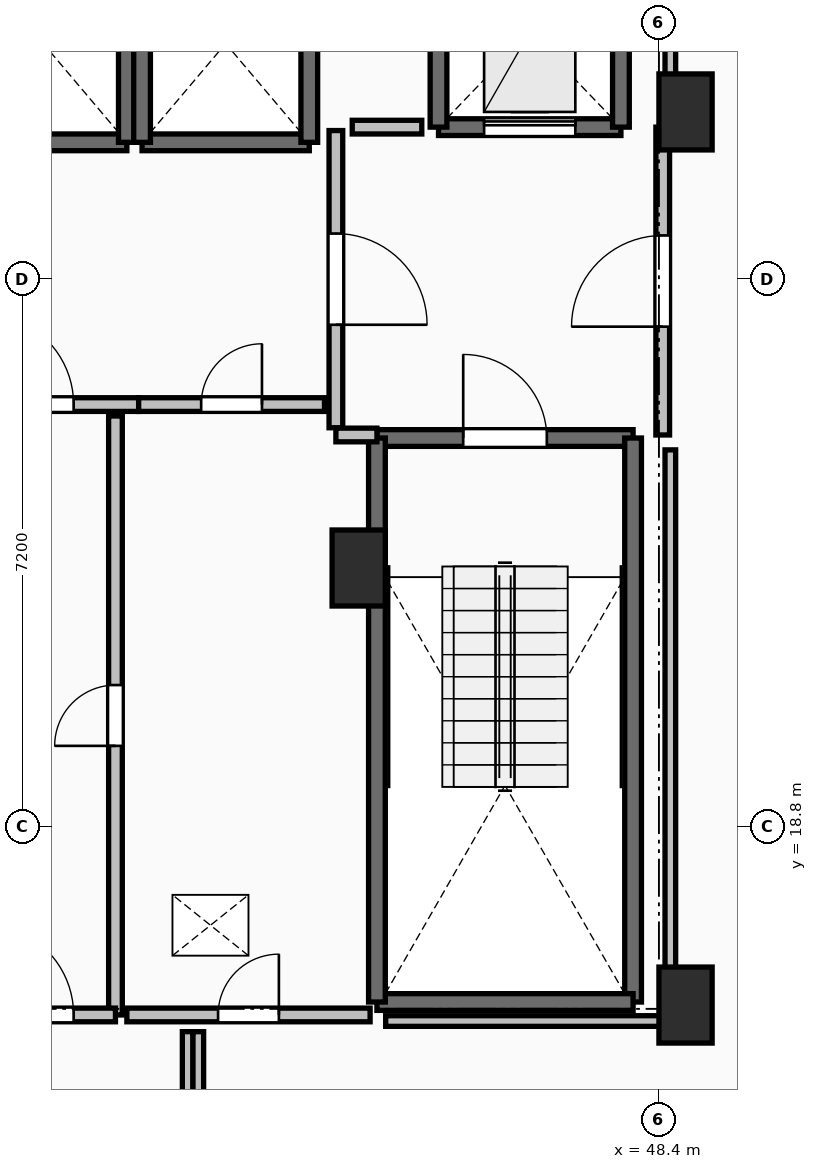
"""IFC4 building model, lengths in metres.
Left out: names, types, materials, properties, quantities, classifications, styles, units other than length and angle.
Written with IfcOpenShell. Run it as: python <this file> out.ifc"""

import sys

from ifc_helpers import new_model, si_unit, direction, frame, frame_2d, origin, origin_2d, place, context, subcontext, project, spatial, rectangle, extrude, element, fill, save


model = new_model("IFC4")
c1 = context("Model", 3, precision=1e-05, world=origin(), true_north=direction((0.0, 1.0)))
c2 = subcontext(c1, "Body", "Model", "MODEL_VIEW")
j1 = project(units=[si_unit("LENGTHUNIT", "METRE"), si_unit("PLANEANGLEUNIT", "RADIAN")], contexts=[c1])
p1 = place(None, origin())
s1 = spatial("IfcSite", under=j1, at=p1, CompositionType="ELEMENT")
p2 = place(p1, origin())
s2 = spatial("IfcBuilding", under=s1, at=p2, CompositionType="ELEMENT")
p3 = place(p2, frame((0.0, 0.0, 200.1)))
s3 = spatial("IfcBuildingStorey", under=s2, at=p3, CompositionType="ELEMENT", Elevation=200.1)
for number, where, z_axis, x_axis in (
    (1, (48.75, 28.2, 0.0), (0.0, 0.0, 1.0), (1.0, 0.0, 0.0)),
    (2, (48.75, 16.45, 0.0), (0.0, 0.0, 1.0), (1.0, 0.0, 0.0)),
    (3, (44.45, 22.2, 0.0), (0.0, 0.0, 1.0), (1.0, 0.0, 0.0)),
):
    element("IfcColumn", number, at=place(p3, frame(where, z_axis=z_axis, x_axis=x_axis)), inside=s3, PredefinedType="PILASTER", context=c2, shape_type="SweptSolid", body=[
        extrude(rectangle(XDim=0.7, YDim=1.0, at=origin_2d()), origin(), (0.0, 0.0, 1.0), 3.55),
    ])
p4 = place(p3, frame((44.69, 23.91, 0.0), z_axis=(0.0, 0.0, 1.0), x_axis=(1.0, 0.0, 0.0)))
e4 = element("IfcWall", 4, at=p4, inside=s3, PredefinedType="SOLIDWALL", context=c2, shape_type="SweptSolid", body=[
    extrude(rectangle(XDim=3.37, YDim=0.22, at=frame_2d((1.685, 0.0))), origin(), (0.0, 0.0, 1.0), 3.29),
])
p5 = place(p4, frame((1.135, 0.0, 0.0)))
e5 = element("IfcOpeningElement", 5, at=p5, cuts=e4, PredefinedType="OPENING", context=c2, shape_type="SweptSolid", body=[
    extrude(rectangle(XDim=1.1, YDim=2.15, at=frame_2d((0.55, 1.075))), frame((0.0, 0.125, 0.0), z_axis=(0.0, -1.0, 0.0), x_axis=(1.0, 0.0, 0.0)), (0.0, 0.0, 1.0), 0.25),
])
p6 = place(p3, frame((48.06, 23.91, 0.0), z_axis=(0.0, 0.0, 1.0), x_axis=(0.0, -1.0, 0.0)))
e6 = element("IfcWall", 6, at=p6, inside=s3, PredefinedType="SOLIDWALL", context=c2, shape_type="SweptSolid", body=[
    extrude(rectangle(XDim=7.42, YDim=0.22, at=frame_2d((3.71, 0.0))), origin(), (0.0, 0.0, 1.0), 3.29),
])
p7 = place(p3, frame((48.06, 16.49, 0.0), z_axis=(0.0, 0.0, 1.0), x_axis=(-1.0, 0.0, 0.0)))
e7 = element("IfcWall", 7, at=p7, inside=s3, PredefinedType="SOLIDWALL", context=c2, shape_type="SweptSolid", body=[
    extrude(rectangle(XDim=3.37, YDim=0.22, at=frame_2d((1.685, 0.0))), origin(), (0.0, 0.0, 1.0), 3.29),
])
p8 = place(p3, frame((44.69, 16.49, 0.0), z_axis=(0.0, 0.0, 1.0), x_axis=(0.0, 1.0, 0.0)))
e8 = element("IfcWall", 8, at=p8, inside=s3, PredefinedType="SOLIDWALL", context=c2, shape_type="SweptSolid", body=[
    extrude(rectangle(XDim=7.42, YDim=0.22, at=frame_2d((3.71, 0.0))), origin(), (0.0, 0.0, 1.0), 3.29),
])
p9 = place(p3, frame((39.2, 27.8, 0.0), z_axis=(0.0, 0.0, 1.0), x_axis=(1.0, 0.0, 0.0)))
e9 = element("IfcWall", 9, at=p9, inside=s3, PredefinedType="SOLIDWALL", context=c2, shape_type="SweptSolid", body=[
    extrude(rectangle(XDim=2.2, YDim=0.22, at=frame_2d((1.1, 0.0))), origin(), (0.0, 0.0, 1.0), 3.29),
])
p10 = place(p3, frame((41.4, 27.8, 0.0), z_axis=(0.0, 0.0, 1.0), x_axis=(0.0, 1.0, 0.0)))
e10 = element("IfcWall", 10, at=p10, inside=s3, PredefinedType="SOLIDWALL", context=c2, shape_type="SweptSolid", body=[
    extrude(rectangle(XDim=2.6, YDim=0.22, at=frame_2d((1.3, 0.0))), origin(), (0.0, 0.0, 1.0), 3.29),
])
p11 = place(p3, frame((41.6, 27.8, 0.0), z_axis=(0.0, 0.0, 1.0), x_axis=(1.0, 0.0, 0.0)))
e11 = element("IfcWall", 11, at=p11, inside=s3, PredefinedType="SOLIDWALL", context=c2, shape_type="SweptSolid", body=[
    extrude(rectangle(XDim=2.2, YDim=0.22, at=frame_2d((1.1, 0.0))), origin(), (0.0, 0.0, 1.0), 3.29),
])
for number, where, z_axis, x_axis in (
    (12, (43.8, 27.8, 0.0), (0.0, 0.0, 1.0), (0.0, 1.0, 0.0)),
    (13, (41.6, 30.4, 0.0), (0.0, 0.0, 1.0), (0.0, -1.0, 0.0)),
):
    element("IfcWall", number, at=place(p3, frame(where, z_axis=z_axis, x_axis=x_axis)), inside=s3, PredefinedType="SOLIDWALL", context=c2, shape_type="SweptSolid", body=[
        extrude(rectangle(XDim=2.6, YDim=0.22, at=frame_2d((1.3, 0.0))), origin(), (0.0, 0.0, 1.0), 3.29),
    ])
p12 = place(p3, frame((45.5, 28.0, 0.0), z_axis=(0.0, 0.0, 1.0), x_axis=(1.0, 0.0, 0.0)))
e14 = element("IfcWall", 14, at=p12, inside=s3, PredefinedType="SHEAR", context=c2, shape_type="SweptSolid", body=[
    extrude(rectangle(XDim=2.4, YDim=0.22, at=frame_2d((1.2, 0.0))), origin(), (0.0, 0.0, 1.0), 3.29),
])
p13 = place(p12, frame((0.6, 0.0, 0.0)))
e15 = element("IfcOpeningElement", 15, at=p13, cuts=e14, PredefinedType="OPENING", context=c2, shape_type="SweptSolid", body=[
    extrude(rectangle(XDim=1.2, YDim=2.2, at=frame_2d((0.6, 1.1))), frame((0.0, 0.125, 0.0), z_axis=(0.0, -1.0, 0.0), x_axis=(1.0, 0.0, 0.0)), (0.0, 0.0, 1.0), 0.25),
])
for number, where, z_axis, x_axis in (
    (16, (47.9, 28.0, 0.0), (0.0, 0.0, 1.0), (0.0, 1.0, 0.0)),
    (17, (45.5, 30.5, 0.0), (0.0, 0.0, 1.0), (0.0, -1.0, 0.0)),
):
    element("IfcWall", number, at=place(p3, frame(where, z_axis=z_axis, x_axis=x_axis)), inside=s3, PredefinedType="SHEAR", context=c2, shape_type="SweptSolid", body=[
        extrude(rectangle(XDim=2.5, YDim=0.22, at=frame_2d((1.25, 0.0))), origin(), (0.0, 0.0, 1.0), 3.29),
    ])
p14 = place(p3, frame((44.15, 27.955, 0.0), z_axis=(0.0, 0.0, 1.0), x_axis=(0.0, -1.0, 0.0)))
e18 = element("IfcWall", 18, at=p14, inside=s3, PredefinedType="PARTITIONING", context=c2, shape_type="SweptSolid", body=[
    extrude(rectangle(XDim=3.91, YDim=0.18, at=frame_2d((1.955, 0.0))), origin(), (0.0, 0.0, 1.0), 3.29),
])
p15 = place(p14, frame((1.355, 0.0, 0.0)))
e19 = element("IfcOpeningElement", 19, at=p15, cuts=e18, PredefinedType="OPENING", context=c2, shape_type="SweptSolid", body=[
    extrude(rectangle(XDim=1.2, YDim=2.15, at=frame_2d((0.6, 1.075))), frame((0.0, 0.105, 0.0), z_axis=(0.0, -1.0, 0.0), x_axis=(1.0, 0.0, 0.0)), (0.0, 0.0, 1.0), 0.21),
])
p16 = place(p3, frame((44.15, 23.95, 0.0), z_axis=(0.0, 0.0, 1.0), x_axis=(1.0, 0.0, 0.0)))
e20 = element("IfcWall", 20, at=p16, inside=s3, PredefinedType="PARTITIONING", context=c2, shape_type="SweptSolid", body=[
    extrude(rectangle(XDim=0.54, YDim=0.18, at=frame_2d((0.27, 0.0))), origin(), (0.0, 0.0, 1.0), 3.29),
])
p17 = place(p3, frame((48.45, 23.95, 0.0), z_axis=(0.0, 0.0, 1.0), x_axis=(0.0, 1.0, 0.0)))
e21 = element("IfcWall", 21, at=p17, inside=s3, PredefinedType="PARTITIONING", context=c2, shape_type="SweptSolid", body=[
    extrude(rectangle(XDim=4.05, YDim=0.18, at=frame_2d((2.025, 0.0))), origin(), (0.0, 0.0, 1.0), 3.29),
])
p18 = place(p17, frame((1.425, 0.0, 0.0)))
e22 = element("IfcOpeningElement", 22, at=p18, cuts=e21, PredefinedType="OPENING", context=c2, shape_type="SweptSolid", body=[
    extrude(rectangle(XDim=1.2, YDim=2.15, at=frame_2d((0.6, 1.075))), frame((0.0, 0.105, 0.0), z_axis=(0.0, -1.0, 0.0), x_axis=(1.0, 0.0, 0.0)), (0.0, 0.0, 1.0), 0.21),
])
p19 = place(p3, frame((38.645, 24.35, 0.0), z_axis=(0.0, 0.0, 1.0), x_axis=(1.0, 0.0, 0.0)))
e23 = element("IfcWall", 23, at=p19, inside=s3, PredefinedType="PARTITIONING", context=c2, shape_type="SweptSolid", body=[
    extrude(rectangle(XDim=2.91, YDim=0.18, at=frame_2d((1.455, 0.0))), origin(), (0.0, 0.0, 1.0), 3.29),
])
p20 = place(p19, frame((0.855, 0.0, 0.0)))
e24 = element("IfcOpeningElement", 24, at=p20, cuts=e23, PredefinedType="OPENING", context=c2, shape_type="SweptSolid", body=[
    extrude(rectangle(XDim=1.2, YDim=2.15, at=frame_2d((0.6, 1.075))), frame((0.0, 0.105, 0.0), z_axis=(0.0, -1.0, 0.0), x_axis=(1.0, 0.0, 0.0)), (0.0, 0.0, 1.0), 0.21),
])
p21 = place(p3, frame((41.555, 24.35, 0.0), z_axis=(0.0, 0.0, 1.0), x_axis=(1.0, 0.0, 0.0)))
e25 = element("IfcWall", 25, at=p21, inside=s3, PredefinedType="PARTITIONING", context=c2, shape_type="SweptSolid", body=[
    extrude(rectangle(XDim=2.445, YDim=0.18, at=frame_2d((1.223, 0.0))), origin(), (0.0, 0.0, 1.0), 3.29),
])
p22 = place(p21, frame((0.823, 0.0, 0.0)))
e26 = element("IfcOpeningElement", 26, at=p22, cuts=e25, PredefinedType="OPENING", context=c2, shape_type="SweptSolid", body=[
    extrude(rectangle(XDim=0.8, YDim=2.05, at=frame_2d((0.4, 1.025))), frame((0.0, 0.105, 0.0), z_axis=(0.0, -1.0, 0.0), x_axis=(1.0, 0.0, 0.0)), (0.0, 0.0, 1.0), 0.21),
])
p23 = place(p3, frame((41.25, 16.32, 0.0), z_axis=(0.0, 0.0, 1.0), x_axis=(0.0, 1.0, 0.0)))
e27 = element("IfcWall", 27, at=p23, inside=s3, PredefinedType="PARTITIONING", context=c2, shape_type="SweptSolid", body=[
    extrude(rectangle(XDim=7.88, YDim=0.18, at=frame_2d((3.94, 0.0))), origin(), (0.0, 0.0, 1.0), 3.29),
])
p24 = place(p23, frame((3.54, 0.0, 0.0)))
e28 = element("IfcOpeningElement", 28, at=p24, cuts=e27, PredefinedType="OPENING", context=c2, shape_type="SweptSolid", body=[
    extrude(rectangle(XDim=0.8, YDim=2.05, at=frame_2d((0.4, 1.025))), frame((0.0, 0.105, 0.0), z_axis=(0.0, -1.0, 0.0), x_axis=(1.0, 0.0, 0.0)), (0.0, 0.0, 1.0), 0.21),
])
p25 = place(p3, frame((38.95, 16.32, 0.0), z_axis=(0.0, 0.0, 1.0), x_axis=(1.0, 0.0, 0.0)))
e29 = element("IfcWall", 29, at=p25, inside=s3, PredefinedType="PARTITIONING", context=c2, shape_type="SweptSolid", body=[
    extrude(rectangle(XDim=2.3, YDim=0.18, at=frame_2d((1.15, 0.0))), origin(), (0.0, 0.0, 1.0), 3.29),
])
p26 = place(p25, frame((0.55, 0.0, 0.0)))
e30 = element("IfcOpeningElement", 30, at=p26, cuts=e29, PredefinedType="OPENING", context=c2, shape_type="SweptSolid", body=[
    extrude(rectangle(XDim=1.2, YDim=2.15, at=frame_2d((0.6, 1.075))), frame((0.0, 0.105, 0.0), z_axis=(0.0, -1.0, 0.0), x_axis=(1.0, 0.0, 0.0)), (0.0, 0.0, 1.0), 0.21),
])
p27 = place(p3, frame((41.4, 16.32, 0.0), z_axis=(0.0, 0.0, 1.0), x_axis=(1.0, 0.0, 0.0)))
e31 = element("IfcWall", 31, at=p27, inside=s3, PredefinedType="PARTITIONING", context=c2, shape_type="SweptSolid", body=[
    extrude(rectangle(XDim=3.2, YDim=0.18, at=frame_2d((1.6, 0.0))), origin(), (0.0, 0.0, 1.0), 3.29),
])
p28 = place(p27, frame((1.2, 0.0, 0.0)))
e32 = element("IfcOpeningElement", 32, at=p28, cuts=e31, PredefinedType="OPENING", context=c2, shape_type="SweptSolid", body=[
    extrude(rectangle(XDim=0.8, YDim=2.05, at=frame_2d((0.4, 1.025))), frame((0.0, 0.105, 0.0), z_axis=(0.0, -1.0, 0.0), x_axis=(1.0, 0.0, 0.0)), (0.0, 0.0, 1.0), 0.21),
])
p29 = place(p3, frame((45.28, 28.0, 0.0), z_axis=(0.0, 0.0, 1.0), x_axis=(-1.0, 0.0, 0.0)))
e33 = element("IfcWall", 33, at=p29, inside=s3, PredefinedType="PARTITIONING", context=c2, shape_type="SweptSolid", body=[
    extrude(rectangle(XDim=0.915, YDim=0.18, at=frame_2d((0.458, 0.0))), origin(), (0.0, 0.0, 1.0), 3.29),
])
p30 = place(p3, frame((48.55, 16.24, 0.0), z_axis=(0.0, 0.0, 1.0), x_axis=(0.0, 1.0, 0.0)))
e34 = element("IfcWall", 34, at=p30, inside=s3, PredefinedType="PARTITIONING", context=c2, shape_type="SweptSolid", body=[
    extrude(rectangle(XDim=7.514, YDim=0.14, at=frame_2d((3.757, 0.0))), origin(), (0.0, 0.0, 1.0), 2.482),
])
p31 = place(p3, frame((48.55, 28.196, 0.0), z_axis=(0.0, 0.0, 1.0), x_axis=(0.0, 1.0, 0.0)))
e35 = element("IfcWall", 35, at=p31, inside=s3, PredefinedType="PARTITIONING", context=c2, shape_type="SweptSolid", body=[
    extrude(rectangle(XDim=5.254, YDim=0.14, at=frame_2d((2.627, 0.0))), origin(), (0.0, 0.0, 1.0), 2.482),
])
for number, where, z_axis, x_axis in (
    (36, (42.2, 16.1, 0.0), (0.0, 0.0, 1.0), (0.0, -1.0, 0.0)),
    (37, (42.34, 14.27, 0.0), (0.0, 0.0, 1.0), (0.0, 1.0, 0.0)),
):
    element("IfcWall", number, at=place(p3, frame(where, z_axis=z_axis, x_axis=x_axis)), inside=s3, PredefinedType="PARTITIONING", context=c2, shape_type="SweptSolid", body=[
        extrude(rectangle(XDim=1.83, YDim=0.14, at=frame_2d((0.915, 0.0))), origin(), (0.0, 0.0, 1.0), 3.29),
    ])
p32 = place(p3, frame((44.805, 16.24, 0.0), z_axis=(0.0, 0.0, 1.0), x_axis=(1.0, 0.0, 0.0)))
e38 = element("IfcWall", 38, at=p32, inside=s3, PredefinedType="PARTITIONING", context=c2, shape_type="SweptSolid", body=[
    extrude(rectangle(XDim=3.745, YDim=0.14, at=frame_2d((1.873, 0.0))), origin(), (0.0, 0.0, 1.0), 2.482),
])
p33 = place(p5, origin())
e39 = element("IfcDoor", 39, at=p33, inside=s3, OperationType="SINGLE_SWING_LEFT", PredefinedType="DOOR", context=c2, shape_type="SweptSolid", body=[
    extrude(rectangle(XDim=1.1, YDim=2.15, at=frame_2d((0.55, 1.075))), frame((0.0, 0.025, 0.0), z_axis=(0.0, -1.0, 0.0), x_axis=(1.0, 0.0, 0.0)), (0.0, 0.0, 1.0), 0.05),
])
fill(e5, e39)
p34 = place(p13, origin())
e40 = element("IfcDoor", 40, at=p34, inside=s3, OperationType="SLIDING_TO_LEFT", PredefinedType="DOOR", context=c2, shape_type="SweptSolid", body=[
    extrude(rectangle(XDim=1.2, YDim=2.2, at=frame_2d((0.6, 1.1))), frame((0.0, 0.025, 0.0), z_axis=(0.0, -1.0, 0.0), x_axis=(1.0, 0.0, 0.0)), (0.0, 0.0, 1.0), 0.05),
])
fill(e15, e40)
p35 = place(p15, origin())
e41 = element("IfcDoor", 41, at=p35, inside=s3, OperationType="SINGLE_SWING_RIGHT", PredefinedType="DOOR", context=c2, shape_type="SweptSolid", body=[
    extrude(rectangle(XDim=1.2, YDim=2.15, at=frame_2d((0.6, 1.075))), frame((0.0, 0.025, 0.0), z_axis=(0.0, -1.0, 0.0), x_axis=(1.0, 0.0, 0.0)), (0.0, 0.0, 1.0), 0.05),
])
fill(e19, e41)
p36 = place(p18, origin())
e42 = element("IfcDoor", 42, at=p36, inside=s3, OperationType="SINGLE_SWING_LEFT", PredefinedType="DOOR", context=c2, shape_type="SweptSolid", body=[
    extrude(rectangle(XDim=1.2, YDim=2.15, at=frame_2d((0.6, 1.075))), frame((0.0, 0.025, 0.0), z_axis=(0.0, -1.0, 0.0), x_axis=(1.0, 0.0, 0.0)), (0.0, 0.0, 1.0), 0.05),
])
fill(e22, e42)
p37 = place(p20, origin())
e43 = element("IfcDoor", 43, at=p37, inside=s3, OperationType="SINGLE_SWING_LEFT", PredefinedType="DOOR", context=c2, shape_type="SweptSolid", body=[
    extrude(rectangle(XDim=1.2, YDim=2.15, at=frame_2d((0.6, 1.075))), frame((0.0, 0.025, 0.0), z_axis=(0.0, -1.0, 0.0), x_axis=(1.0, 0.0, 0.0)), (0.0, 0.0, 1.0), 0.05),
])
fill(e24, e43)
p38 = place(p22, origin())
e44 = element("IfcDoor", 44, at=p38, inside=s3, OperationType="SINGLE_SWING_RIGHT", PredefinedType="DOOR", context=c2, shape_type="SweptSolid", body=[
    extrude(rectangle(XDim=0.8, YDim=2.05, at=frame_2d((0.4, 1.025))), frame((0.0, 0.025, 0.0), z_axis=(0.0, -1.0, 0.0), x_axis=(1.0, 0.0, 0.0)), (0.0, 0.0, 1.0), 0.05),
])
fill(e26, e44)
p39 = place(p24, origin())
e45 = element("IfcDoor", 45, at=p39, inside=s3, OperationType="SINGLE_SWING_LEFT", PredefinedType="DOOR", context=c2, shape_type="SweptSolid", body=[
    extrude(rectangle(XDim=0.8, YDim=2.05, at=frame_2d((0.4, 1.025))), frame((0.0, 0.025, 0.0), z_axis=(0.0, -1.0, 0.0), x_axis=(1.0, 0.0, 0.0)), (0.0, 0.0, 1.0), 0.05),
])
fill(e28, e45)
p40 = place(p26, origin())
e46 = element("IfcDoor", 46, at=p40, inside=s3, OperationType="SINGLE_SWING_LEFT", PredefinedType="DOOR", context=c2, shape_type="SweptSolid", body=[
    extrude(rectangle(XDim=1.2, YDim=2.15, at=frame_2d((0.6, 1.075))), frame((0.0, 0.025, 0.0), z_axis=(0.0, -1.0, 0.0), x_axis=(1.0, 0.0, 0.0)), (0.0, 0.0, 1.0), 0.05),
])
fill(e30, e46)
p41 = place(p28, origin())
e47 = element("IfcDoor", 47, at=p41, inside=s3, OperationType="SINGLE_SWING_RIGHT", PredefinedType="DOOR", context=c2, shape_type="SweptSolid", body=[
    extrude(rectangle(XDim=0.8, YDim=2.05, at=frame_2d((0.4, 1.025))), frame((0.0, 0.025, 0.0), z_axis=(0.0, -1.0, 0.0), x_axis=(1.0, 0.0, 0.0)), (0.0, 0.0, 1.0), 0.05),
])
fill(e32, e47)
save(model, sys.argv[1])
